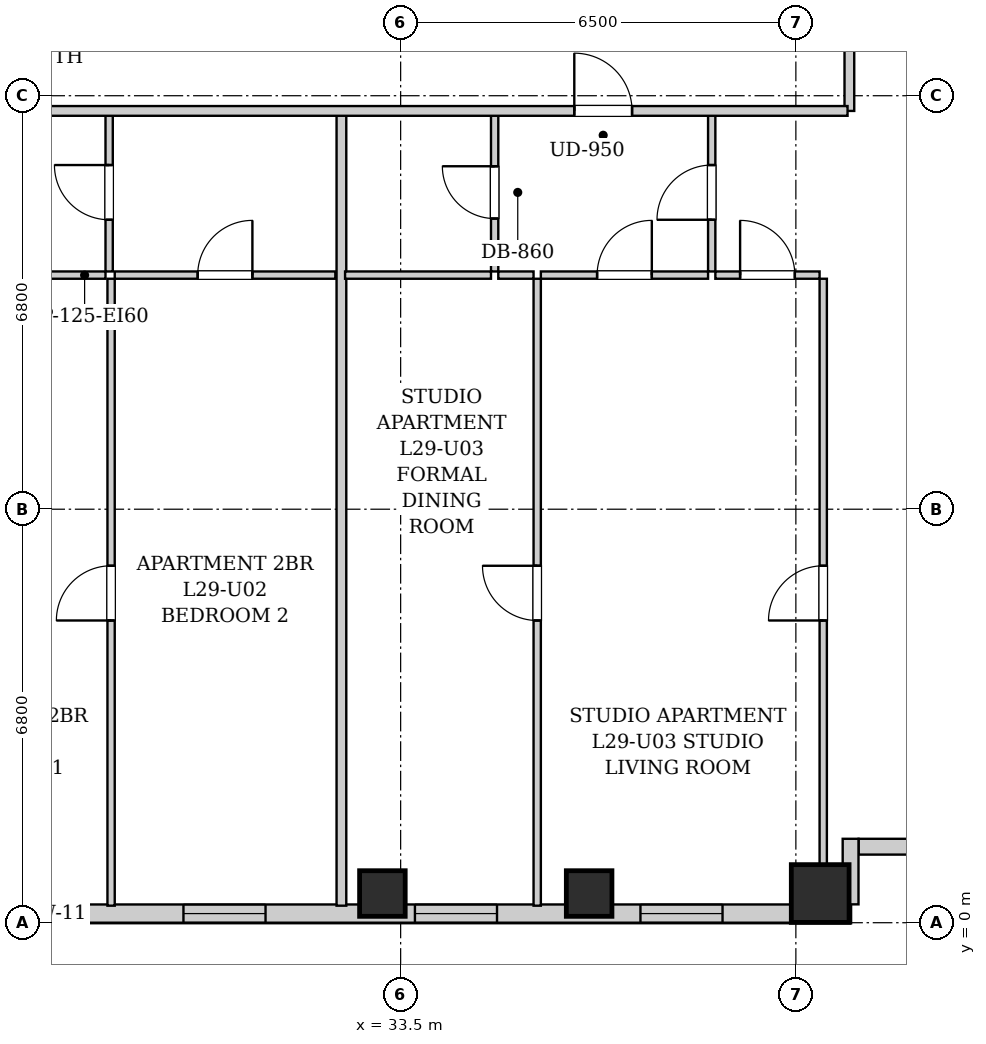
"""IFC4 building model, lengths in metres.
Left out: names, types, materials, properties, quantities, classifications, styles, units other than length and angle.
Written with IfcOpenShell. Run it as: python <this file> out.ifc"""

import sys

from ifc_helpers import new_model, si_unit, direction, frame, frame_2d, origin, origin_2d, place, context, subcontext, project, spatial, rectangle, extrude, element, fill, save


model = new_model("IFC4")
c1 = context("Model", 3, precision=1e-05, world=origin(), true_north=direction((0.0, 1.0)))
c2 = subcontext(c1, "Body", "Model", "MODEL_VIEW")
j1 = project(units=[si_unit("LENGTHUNIT", "METRE"), si_unit("PLANEANGLEUNIT", "RADIAN")], contexts=[c1])
p1 = place(None, origin())
s1 = spatial("IfcSite", under=j1, at=p1, CompositionType="ELEMENT")
p2 = place(p1, origin())
s2 = spatial("IfcBuilding", under=s1, at=p2, CompositionType="ELEMENT")
p3 = place(p2, frame((0.0, 0.0, 103.9)))
s3 = spatial("IfcBuildingStorey", under=s2, at=p3, CompositionType="ELEMENT", Elevation=103.9)
for number, where, z_axis, x_axis in (
    (1, (33.2, 0.48, 0.0), (0.0, 0.0, 1.0), (1.0, 0.0, 0.0)),
    (2, (36.6, 0.48, 0.0), (0.0, 0.0, 1.0), (1.0, 0.0, 0.0)),
):
    element("IfcColumn", number, at=place(p3, frame(where, z_axis=z_axis, x_axis=x_axis)), inside=s3, PredefinedType="COLUMN", context=c2, shape_type="SweptSolid", body=[
        extrude(rectangle(XDim=0.75, YDim=0.75, at=origin_2d()), origin(), (0.0, 0.0, 1.0), 3.2),
    ])
p4 = place(p3, frame((40.4, 0.48, 0.0), z_axis=(0.0, 0.0, 1.0), x_axis=(1.0, 0.0, 0.0)))
e3 = element("IfcColumn", 3, at=p4, inside=s3, PredefinedType="COLUMN", context=c2, shape_type="SweptSolid", body=[
    extrude(rectangle(XDim=0.95, YDim=0.95, at=origin_2d()), origin(), (0.0, 0.0, 1.0), 3.2),
])
p5 = place(p3, frame((40.9, 0.15, 0.0), z_axis=(0.0, 0.0, 1.0), x_axis=(-1.0, 0.0, 0.0)))
e4 = element("IfcWall", 4, at=p5, inside=s3, PredefinedType="SOLIDWALL", context=c2, shape_type="SweptSolid", body=[
    extrude(rectangle(XDim=23.15, YDim=0.3, at=frame_2d((11.575, 0.0))), origin(), (0.0, 0.0, 1.0), 2.94),
])
p6 = place(p5, frame((20.296, 0.0, 0.55)))
e5 = element("IfcOpeningElement", 5, at=p6, cuts=e4, PredefinedType="OPENING", context=c2, shape_type="SweptSolid", body=[
    extrude(rectangle(XDim=1.35, YDim=1.2, at=frame_2d((0.675, 0.6))), frame((0.0, 0.16, 0.0), z_axis=(0.0, -1.0, 0.0), x_axis=(1.0, 0.0, 0.0)), (0.0, 0.0, 1.0), 0.32),
])
p7 = place(p5, frame((12.55, 0.0, 0.55)))
e6 = element("IfcOpeningElement", 6, at=p7, cuts=e4, PredefinedType="OPENING", context=c2, shape_type="SweptSolid", body=[
    extrude(rectangle(XDim=0.85, YDim=1.2, at=frame_2d((0.425, 0.6))), frame((0.0, 0.16, 0.0), z_axis=(0.0, -1.0, 0.0), x_axis=(1.0, 0.0, 0.0)), (0.0, 0.0, 1.0), 0.32),
])
p8 = place(p5, frame((9.622, 0.0, 0.55)))
e7 = element("IfcOpeningElement", 7, at=p8, cuts=e4, PredefinedType="OPENING", context=c2, shape_type="SweptSolid", body=[
    extrude(rectangle(XDim=1.35, YDim=1.2, at=frame_2d((0.675, 0.6))), frame((0.0, 0.16, 0.0), z_axis=(0.0, -1.0, 0.0), x_axis=(1.0, 0.0, 0.0)), (0.0, 0.0, 1.0), 0.32),
])
p9 = place(p5, frame((5.815, 0.0, 0.55)))
e8 = element("IfcOpeningElement", 8, at=p9, cuts=e4, PredefinedType="OPENING", context=c2, shape_type="SweptSolid", body=[
    extrude(rectangle(XDim=1.35, YDim=1.2, at=frame_2d((0.675, 0.6))), frame((0.0, 0.16, 0.0), z_axis=(0.0, -1.0, 0.0), x_axis=(1.0, 0.0, 0.0)), (0.0, 0.0, 1.0), 0.32),
])
p10 = place(p5, frame((2.106, 0.0, 0.55)))
e9 = element("IfcOpeningElement", 9, at=p10, cuts=e4, PredefinedType="OPENING", context=c2, shape_type="SweptSolid", body=[
    extrude(rectangle(XDim=1.35, YDim=1.2, at=frame_2d((0.675, 0.6))), frame((0.0, 0.16, 0.0), z_axis=(0.0, -1.0, 0.0), x_axis=(1.0, 0.0, 0.0)), (0.0, 0.0, 1.0), 0.32),
])
p11 = place(p3, frame((42.018, 1.25, 0.0), z_axis=(0.0, 0.0, 1.0), x_axis=(-1.0, 0.0, 0.0)))
e10 = element("IfcWall", 10, at=p11, inside=s3, PredefinedType="SOLIDWALL", context=c2, shape_type="SweptSolid", body=[
    extrude(rectangle(XDim=0.986, YDim=0.26, at=frame_2d((0.493, 0.0))), origin(), (0.0, 0.0, 1.0), 2.94),
])
p12 = place(p3, frame((40.9, 1.38, 0.0), z_axis=(0.0, 0.0, 1.0), x_axis=(0.0, -1.0, 0.0)))
e11 = element("IfcWall", 11, at=p12, inside=s3, PredefinedType="SOLIDWALL", context=c2, shape_type="SweptSolid", body=[
    extrude(rectangle(XDim=1.078, YDim=0.26, at=frame_2d((0.539, 0.0))), origin(), (0.0, 0.0, 1.0), 2.94),
])
p13 = place(p3, frame((40.88, 13.35, 0.0), z_axis=(0.0, 0.0, 1.0), x_axis=(0.0, 1.0, 0.0)))
e12 = element("IfcWall", 12, at=p13, inside=s3, PredefinedType="PARTITIONING", context=c2, shape_type="SweptSolid", body=[
    extrude(rectangle(XDim=1.74, YDim=0.16, at=frame_2d((0.87, 0.0))), origin(), (0.0, 0.0, 1.0), 2.94),
])
p14 = place(p3, frame((28.706, 10.71, 0.0), z_axis=(0.0, 0.0, 1.0), x_axis=(0.0, 1.0, 0.0)))
e13 = element("IfcWall", 13, at=p14, inside=s3, PredefinedType="PARTITIONING", context=c2, shape_type="SweptSolid", body=[
    extrude(rectangle(XDim=2.6, YDim=0.12, at=frame_2d((1.3, 0.0))), origin(), (0.0, 0.0, 1.0), 2.94),
])
p15 = place(p14, frame((0.85, 0.0, 0.0)))
e14 = element("IfcOpeningElement", 14, at=p15, cuts=e13, PredefinedType="OPENING", context=c2, shape_type="SweptSolid", body=[
    extrude(rectangle(XDim=0.9, YDim=2.05, at=frame_2d((0.45, 1.025))), frame((0.0, 0.07, 0.0), z_axis=(0.0, -1.0, 0.0), x_axis=(1.0, 0.0, 0.0)), (0.0, 0.0, 1.0), 0.14),
])
p16 = place(p3, frame((25.396, 10.65, 0.0), z_axis=(0.0, 0.0, 1.0), x_axis=(1.0, 0.0, 0.0)))
e15 = element("IfcWall", 15, at=p16, inside=s3, PredefinedType="PARTITIONING", context=c2, shape_type="SweptSolid", body=[
    extrude(rectangle(XDim=3.25, YDim=0.12, at=frame_2d((1.625, 0.0))), origin(), (0.0, 0.0, 1.0), 2.94),
])
p17 = place(p16, frame((1.175, 0.0, 0.0)))
e16 = element("IfcOpeningElement", 16, at=p17, cuts=e15, PredefinedType="OPENING", context=c2, shape_type="SweptSolid", body=[
    extrude(rectangle(XDim=0.9, YDim=2.05, at=frame_2d((0.45, 1.025))), frame((0.0, 0.07, 0.0), z_axis=(0.0, -1.0, 0.0), x_axis=(1.0, 0.0, 0.0)), (0.0, 0.0, 1.0), 0.14),
])
p18 = place(p3, frame((28.798, 10.65, 0.0), z_axis=(0.0, 0.0, 1.0), x_axis=(1.0, 0.0, 0.0)))
e17 = element("IfcWall", 17, at=p18, inside=s3, PredefinedType="PARTITIONING", context=c2, shape_type="SweptSolid", body=[
    extrude(rectangle(XDim=3.628, YDim=0.12, at=frame_2d((1.814, 0.0))), origin(), (0.0, 0.0, 1.0), 2.94),
])
p19 = place(p18, frame((1.364, 0.0, 0.0)))
e18 = element("IfcOpeningElement", 18, at=p19, cuts=e17, PredefinedType="OPENING", context=c2, shape_type="SweptSolid", body=[
    extrude(rectangle(XDim=0.9, YDim=2.05, at=frame_2d((0.45, 1.025))), frame((0.0, 0.07, 0.0), z_axis=(0.0, -1.0, 0.0), x_axis=(1.0, 0.0, 0.0)), (0.0, 0.0, 1.0), 0.14),
])
p20 = place(p3, frame((28.738, 0.28, 0.0), z_axis=(0.0, 0.0, 1.0), x_axis=(0.0, 1.0, 0.0)))
e19 = element("IfcWall", 19, at=p20, inside=s3, PredefinedType="PARTITIONING", context=c2, shape_type="SweptSolid", body=[
    extrude(rectangle(XDim=10.31, YDim=0.12, at=frame_2d((5.155, 0.0))), origin(), (0.0, 0.0, 1.0), 2.94),
])
p21 = place(p20, frame((4.69, 0.0, 0.0)))
e20 = element("IfcOpeningElement", 20, at=p21, cuts=e19, PredefinedType="OPENING", context=c2, shape_type="SweptSolid", body=[
    extrude(rectangle(XDim=0.9, YDim=2.05, at=frame_2d((0.45, 1.025))), frame((0.0, 0.07, 0.0), z_axis=(0.0, -1.0, 0.0), x_axis=(1.0, 0.0, 0.0)), (0.0, 0.0, 1.0), 0.14),
])
p22 = place(p3, frame((32.526, 0.28, 0.0), z_axis=(0.0, 0.0, 1.0), x_axis=(0.0, 1.0, 0.0)))
e21 = element("IfcWall", 21, at=p22, inside=s3, PredefinedType="PARTITIONING", context=c2, shape_type="SweptSolid", body=[
    extrude(rectangle(XDim=13.03, YDim=0.16, at=frame_2d((6.515, 0.0))), origin(), (0.0, 0.0, 1.0), 2.94),
])
p23 = place(p3, frame((35.046, 10.71, 0.0), z_axis=(0.0, 0.0, 1.0), x_axis=(0.0, 1.0, 0.0)))
e22 = element("IfcWall", 22, at=p23, inside=s3, PredefinedType="PARTITIONING", context=c2, shape_type="SweptSolid", body=[
    extrude(rectangle(XDim=2.6, YDim=0.12, at=frame_2d((1.3, 0.0))), origin(), (0.0, 0.0, 1.0), 2.94),
])
p24 = place(p23, frame((0.87, 0.0, 0.0)))
e23 = element("IfcOpeningElement", 23, at=p24, cuts=e22, PredefinedType="OPENING", context=c2, shape_type="SweptSolid", body=[
    extrude(rectangle(XDim=0.86, YDim=2.05, at=frame_2d((0.43, 1.025))), frame((0.0, 0.07, 0.0), z_axis=(0.0, -1.0, 0.0), x_axis=(1.0, 0.0, 0.0)), (0.0, 0.0, 1.0), 0.14),
])
p25 = place(p3, frame((32.586, 10.65, 0.0), z_axis=(0.0, 0.0, 1.0), x_axis=(1.0, 0.0, 0.0)))
e24 = element("IfcWall", 24, at=p25, inside=s3, PredefinedType="PARTITIONING", context=c2, shape_type="SweptSolid", body=[
    extrude(rectangle(XDim=2.4, YDim=0.12, at=frame_2d((1.2, 0.0))), origin(), (0.0, 0.0, 1.0), 2.94),
])
p26 = place(p3, frame((38.616, 10.71, 0.0), z_axis=(0.0, 0.0, 1.0), x_axis=(0.0, 1.0, 0.0)))
e25 = element("IfcWall", 25, at=p26, inside=s3, PredefinedType="PARTITIONING", context=c2, shape_type="SweptSolid", body=[
    extrude(rectangle(XDim=2.6, YDim=0.12, at=frame_2d((1.3, 0.0))), origin(), (0.0, 0.0, 1.0), 2.94),
])
p27 = place(p26, frame((0.85, 0.0, 0.0)))
e26 = element("IfcOpeningElement", 26, at=p27, cuts=e25, PredefinedType="OPENING", context=c2, shape_type="SweptSolid", body=[
    extrude(rectangle(XDim=0.9, YDim=2.05, at=frame_2d((0.45, 1.025))), frame((0.0, 0.07, 0.0), z_axis=(0.0, -1.0, 0.0), x_axis=(1.0, 0.0, 0.0)), (0.0, 0.0, 1.0), 0.14),
])
p28 = place(p3, frame((35.106, 10.65, 0.0), z_axis=(0.0, 0.0, 1.0), x_axis=(1.0, 0.0, 0.0)))
e27 = element("IfcWall", 27, at=p28, inside=s3, PredefinedType="PARTITIONING", context=c2, shape_type="SweptSolid", body=[
    extrude(rectangle(XDim=0.58, YDim=0.12, at=frame_2d((0.29, 0.0))), origin(), (0.0, 0.0, 1.0), 2.94),
])
p29 = place(p3, frame((35.806, 10.65, 0.0), z_axis=(0.0, 0.0, 1.0), x_axis=(1.0, 0.0, 0.0)))
e28 = element("IfcWall", 28, at=p29, inside=s3, PredefinedType="PARTITIONING", context=c2, shape_type="SweptSolid", body=[
    extrude(rectangle(XDim=2.75, YDim=0.12, at=frame_2d((1.375, 0.0))), origin(), (0.0, 0.0, 1.0), 2.94),
])
p30 = place(p29, frame((0.925, 0.0, 0.0)))
e29 = element("IfcOpeningElement", 29, at=p30, cuts=e28, PredefinedType="OPENING", context=c2, shape_type="SweptSolid", body=[
    extrude(rectangle(XDim=0.9, YDim=2.05, at=frame_2d((0.45, 1.025))), frame((0.0, 0.07, 0.0), z_axis=(0.0, -1.0, 0.0), x_axis=(1.0, 0.0, 0.0)), (0.0, 0.0, 1.0), 0.14),
])
p31 = place(p3, frame((38.676, 10.65, 0.0), z_axis=(0.0, 0.0, 1.0), x_axis=(1.0, 0.0, 0.0)))
e30 = element("IfcWall", 30, at=p31, inside=s3, PredefinedType="PARTITIONING", context=c2, shape_type="SweptSolid", body=[
    extrude(rectangle(XDim=1.714, YDim=0.12, at=frame_2d((0.857, 0.0))), origin(), (0.0, 0.0, 1.0), 2.94),
])
p32 = place(p31, frame((0.407, 0.0, 0.0)))
e31 = element("IfcOpeningElement", 31, at=p32, cuts=e30, PredefinedType="OPENING", context=c2, shape_type="SweptSolid", body=[
    extrude(rectangle(XDim=0.9, YDim=2.05, at=frame_2d((0.45, 1.025))), frame((0.0, 0.07, 0.0), z_axis=(0.0, -1.0, 0.0), x_axis=(1.0, 0.0, 0.0)), (0.0, 0.0, 1.0), 0.14),
])
p33 = place(p3, frame((35.746, 0.28, 0.0), z_axis=(0.0, 0.0, 1.0), x_axis=(0.0, 1.0, 0.0)))
e32 = element("IfcWall", 32, at=p33, inside=s3, PredefinedType="PARTITIONING", context=c2, shape_type="SweptSolid", body=[
    extrude(rectangle(XDim=10.31, YDim=0.12, at=frame_2d((5.155, 0.0))), origin(), (0.0, 0.0, 1.0), 2.94),
])
p34 = place(p33, frame((4.69, 0.0, 0.0)))
e33 = element("IfcOpeningElement", 33, at=p34, cuts=e32, PredefinedType="OPENING", context=c2, shape_type="SweptSolid", body=[
    extrude(rectangle(XDim=0.9, YDim=2.05, at=frame_2d((0.45, 1.025))), frame((0.0, 0.07, 0.0), z_axis=(0.0, -1.0, 0.0), x_axis=(1.0, 0.0, 0.0)), (0.0, 0.0, 1.0), 0.14),
])
p35 = place(p3, frame((40.45, 0.28, 0.0), z_axis=(0.0, 0.0, 1.0), x_axis=(0.0, 1.0, 0.0)))
e34 = element("IfcWall", 34, at=p35, inside=s3, PredefinedType="PARTITIONING", context=c2, shape_type="SweptSolid", body=[
    extrude(rectangle(XDim=10.31, YDim=0.12, at=frame_2d((5.155, 0.0))), origin(), (0.0, 0.0, 1.0), 2.94),
])
p36 = place(p35, frame((4.69, 0.0, 0.0)))
e35 = element("IfcOpeningElement", 35, at=p36, cuts=e34, PredefinedType="OPENING", context=c2, shape_type="SweptSolid", body=[
    extrude(rectangle(XDim=0.9, YDim=2.05, at=frame_2d((0.45, 1.025))), frame((0.0, 0.07, 0.0), z_axis=(0.0, -1.0, 0.0), x_axis=(1.0, 0.0, 0.0)), (0.0, 0.0, 1.0), 0.14),
])
p37 = place(p3, frame((10.05, 13.35, 0.0), z_axis=(0.0, 0.0, 1.0), x_axis=(1.0, 0.0, 0.0)))
e36 = element("IfcWall", 36, at=p37, inside=s3, PredefinedType="PARTITIONING", context=c2, shape_type="SweptSolid", body=[
    extrude(rectangle(XDim=30.8, YDim=0.16, at=frame_2d((15.4, 0.0))), origin(), (0.0, 0.0, 1.0), 2.94),
])
p38 = place(p37, frame((2.893, 0.0, 0.0)))
e37 = element("IfcOpeningElement", 37, at=p38, cuts=e36, PredefinedType="OPENING", context=c2, shape_type="SweptSolid", body=[
    extrude(rectangle(XDim=0.95, YDim=2.1, at=frame_2d((0.475, 1.05))), frame((0.0, 0.09, 0.0), z_axis=(0.0, -1.0, 0.0), x_axis=(1.0, 0.0, 0.0)), (0.0, 0.0, 1.0), 0.18),
])
p39 = place(p37, frame((9.161, 0.0, 0.0)))
e38 = element("IfcOpeningElement", 38, at=p39, cuts=e36, PredefinedType="OPENING", context=c2, shape_type="SweptSolid", body=[
    extrude(rectangle(XDim=0.95, YDim=2.1, at=frame_2d((0.475, 1.05))), frame((0.0, 0.09, 0.0), z_axis=(0.0, -1.0, 0.0), x_axis=(1.0, 0.0, 0.0)), (0.0, 0.0, 1.0), 0.18),
])
p40 = place(p37, frame((26.306, 0.0, 0.0)))
e39 = element("IfcOpeningElement", 39, at=p40, cuts=e36, PredefinedType="OPENING", context=c2, shape_type="SweptSolid", body=[
    extrude(rectangle(XDim=0.95, YDim=2.1, at=frame_2d((0.475, 1.05))), frame((0.0, 0.09, 0.0), z_axis=(0.0, -1.0, 0.0), x_axis=(1.0, 0.0, 0.0)), (0.0, 0.0, 1.0), 0.18),
])
p41 = place(p15, origin())
e40 = element("IfcDoor", 40, at=p41, inside=s3, OperationType="SINGLE_SWING_RIGHT", PredefinedType="DOOR", context=c2, shape_type="SweptSolid", body=[
    extrude(rectangle(XDim=0.9, YDim=2.05, at=frame_2d((0.45, 1.025))), frame((0.0, 0.025, 0.0), z_axis=(0.0, -1.0, 0.0), x_axis=(1.0, 0.0, 0.0)), (0.0, 0.0, 1.0), 0.05),
])
fill(e14, e40)
p42 = place(p19, origin())
e41 = element("IfcDoor", 41, at=p42, inside=s3, OperationType="SINGLE_SWING_RIGHT", PredefinedType="DOOR", context=c2, shape_type="SweptSolid", body=[
    extrude(rectangle(XDim=0.9, YDim=2.05, at=frame_2d((0.45, 1.025))), frame((0.0, 0.025, 0.0), z_axis=(0.0, -1.0, 0.0), x_axis=(1.0, 0.0, 0.0)), (0.0, 0.0, 1.0), 0.05),
])
fill(e18, e41)
p43 = place(p21, origin())
e42 = element("IfcDoor", 42, at=p43, inside=s3, OperationType="SINGLE_SWING_LEFT", PredefinedType="DOOR", context=c2, shape_type="SweptSolid", body=[
    extrude(rectangle(XDim=0.9, YDim=2.05, at=frame_2d((0.45, 1.025))), frame((0.0, 0.025, 0.0), z_axis=(0.0, -1.0, 0.0), x_axis=(1.0, 0.0, 0.0)), (0.0, 0.0, 1.0), 0.05),
])
fill(e20, e42)
p44 = place(p24, origin())
e43 = element("IfcDoor", 43, at=p44, inside=s3, OperationType="SINGLE_SWING_RIGHT", PredefinedType="DOOR", context=c2, shape_type="SweptSolid", body=[
    extrude(rectangle(XDim=0.86, YDim=2.05, at=frame_2d((0.43, 1.025))), frame((0.0, 0.025, 0.0), z_axis=(0.0, -1.0, 0.0), x_axis=(1.0, 0.0, 0.0)), (0.0, 0.0, 1.0), 0.05),
])
fill(e23, e43)
p45 = place(p27, origin())
e44 = element("IfcDoor", 44, at=p45, inside=s3, OperationType="SINGLE_SWING_LEFT", PredefinedType="DOOR", context=c2, shape_type="SweptSolid", body=[
    extrude(rectangle(XDim=0.9, YDim=2.05, at=frame_2d((0.45, 1.025))), frame((0.0, 0.025, 0.0), z_axis=(0.0, -1.0, 0.0), x_axis=(1.0, 0.0, 0.0)), (0.0, 0.0, 1.0), 0.05),
])
fill(e26, e44)
p46 = place(p30, origin())
e45 = element("IfcDoor", 45, at=p46, inside=s3, OperationType="SINGLE_SWING_RIGHT", PredefinedType="DOOR", context=c2, shape_type="SweptSolid", body=[
    extrude(rectangle(XDim=0.9, YDim=2.05, at=frame_2d((0.45, 1.025))), frame((0.0, 0.025, 0.0), z_axis=(0.0, -1.0, 0.0), x_axis=(1.0, 0.0, 0.0)), (0.0, 0.0, 1.0), 0.05),
])
fill(e29, e45)
p47 = place(p32, origin())
e46 = element("IfcDoor", 46, at=p47, inside=s3, OperationType="SINGLE_SWING_LEFT", PredefinedType="DOOR", context=c2, shape_type="SweptSolid", body=[
    extrude(rectangle(XDim=0.9, YDim=2.05, at=frame_2d((0.45, 1.025))), frame((0.0, 0.025, 0.0), z_axis=(0.0, -1.0, 0.0), x_axis=(1.0, 0.0, 0.0)), (0.0, 0.0, 1.0), 0.05),
])
fill(e31, e46)
p48 = place(p34, origin())
e47 = element("IfcDoor", 47, at=p48, inside=s3, OperationType="SINGLE_SWING_RIGHT", PredefinedType="DOOR", context=c2, shape_type="SweptSolid", body=[
    extrude(rectangle(XDim=0.9, YDim=2.05, at=frame_2d((0.45, 1.025))), frame((0.0, 0.025, 0.0), z_axis=(0.0, -1.0, 0.0), x_axis=(1.0, 0.0, 0.0)), (0.0, 0.0, 1.0), 0.05),
])
fill(e33, e47)
p49 = place(p36, origin())
e48 = element("IfcDoor", 48, at=p49, inside=s3, OperationType="SINGLE_SWING_LEFT", PredefinedType="DOOR", context=c2, shape_type="SweptSolid", body=[
    extrude(rectangle(XDim=0.9, YDim=2.05, at=frame_2d((0.45, 1.025))), frame((0.0, 0.025, 0.0), z_axis=(0.0, -1.0, 0.0), x_axis=(1.0, 0.0, 0.0)), (0.0, 0.0, 1.0), 0.05),
])
fill(e35, e48)
p50 = place(p40, origin())
e49 = element("IfcDoor", 49, at=p50, inside=s3, OperationType="SINGLE_SWING_LEFT", PredefinedType="DOOR", context=c2, shape_type="SweptSolid", body=[
    extrude(rectangle(XDim=0.95, YDim=2.1, at=frame_2d((0.475, 1.05))), frame((0.0, 0.025, 0.0), z_axis=(0.0, -1.0, 0.0), x_axis=(1.0, 0.0, 0.0)), (0.0, 0.0, 1.0), 0.05),
])
fill(e39, e49)
p51 = place(p7, origin())
e50 = element("IfcWindow", 50, at=p51, inside=s3, PartitioningType="SINGLE_PANEL", PredefinedType="WINDOW", context=c2, shape_type="SweptSolid", body=[
    extrude(rectangle(XDim=0.85, YDim=1.2, at=frame_2d((0.425, 0.6))), frame((0.0, 0.03, 0.0), z_axis=(0.0, -1.0, 0.0), x_axis=(1.0, 0.0, 0.0)), (0.0, 0.0, 1.0), 0.06),
])
fill(e6, e50)
p52 = place(p8, origin())
e51 = element("IfcWindow", 51, at=p52, inside=s3, PartitioningType="SINGLE_PANEL", PredefinedType="WINDOW", context=c2, shape_type="SweptSolid", body=[
    extrude(rectangle(XDim=1.35, YDim=1.2, at=frame_2d((0.675, 0.6))), frame((0.0, 0.03, 0.0), z_axis=(0.0, -1.0, 0.0), x_axis=(1.0, 0.0, 0.0)), (0.0, 0.0, 1.0), 0.06),
])
fill(e7, e51)
p53 = place(p9, origin())
e52 = element("IfcWindow", 52, at=p53, inside=s3, PartitioningType="SINGLE_PANEL", PredefinedType="WINDOW", context=c2, shape_type="SweptSolid", body=[
    extrude(rectangle(XDim=1.35, YDim=1.2, at=frame_2d((0.675, 0.6))), frame((0.0, 0.03, 0.0), z_axis=(0.0, -1.0, 0.0), x_axis=(1.0, 0.0, 0.0)), (0.0, 0.0, 1.0), 0.06),
])
fill(e8, e52)
p54 = place(p10, origin())
e53 = element("IfcWindow", 53, at=p54, inside=s3, PartitioningType="SINGLE_PANEL", PredefinedType="WINDOW", context=c2, shape_type="SweptSolid", body=[
    extrude(rectangle(XDim=1.35, YDim=1.2, at=frame_2d((0.675, 0.6))), frame((0.0, 0.03, 0.0), z_axis=(0.0, -1.0, 0.0), x_axis=(1.0, 0.0, 0.0)), (0.0, 0.0, 1.0), 0.06),
])
fill(e9, e53)
save(model, sys.argv[1])
